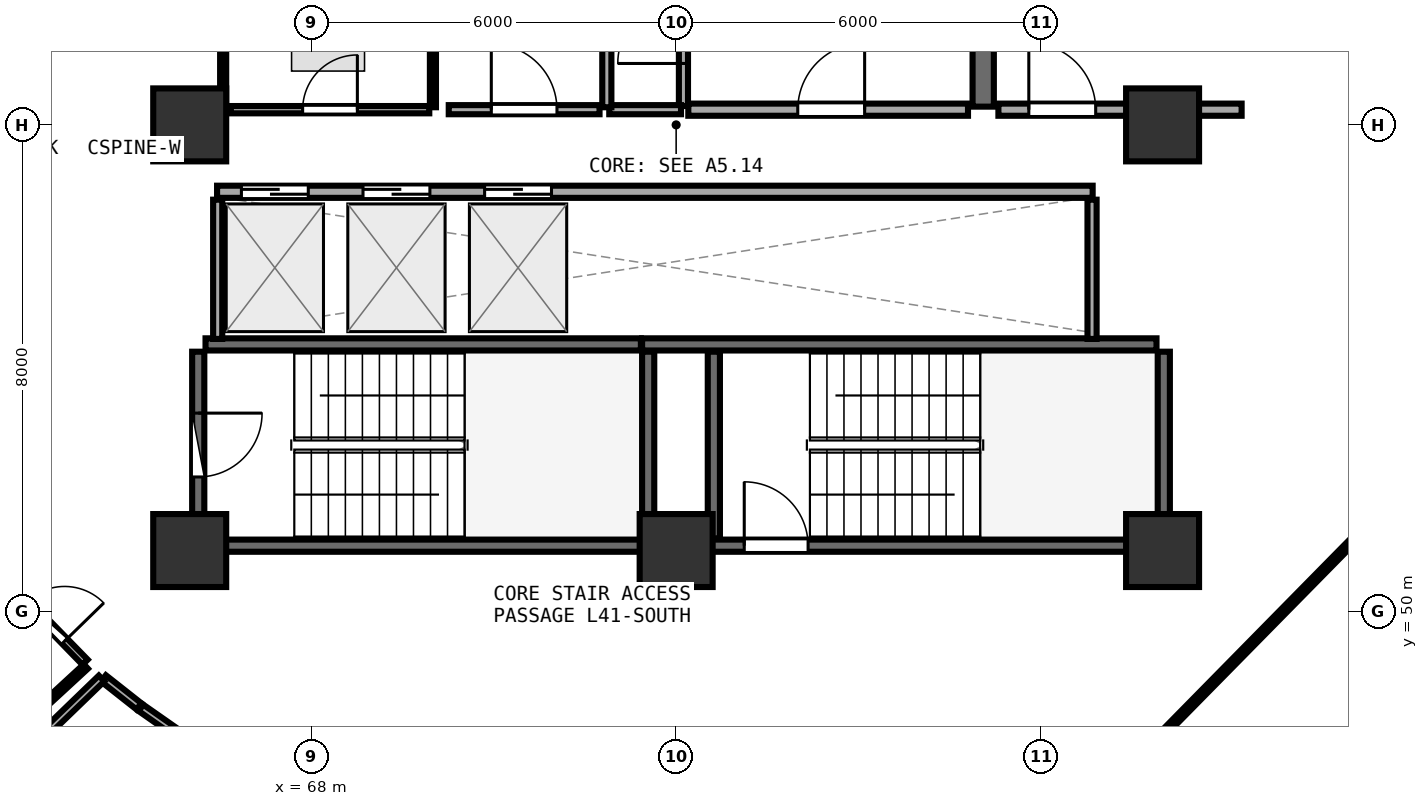
"""IFC4 building model, lengths in metres.
Left out: names, types, materials, properties, quantities, classifications, styles, units other than length and angle.
Written with IfcOpenShell. Run it as: python <this file> out.ifc"""

import sys

from ifc_helpers import new_model, si_unit, direction, frame, frame_2d, origin, origin_2d, place, context, subcontext, project, spatial, rectangle, extrude, element, fill, save


model = new_model("IFC4")
c1 = context("Model", 3, precision=1e-05, world=origin(), true_north=direction((0.0, 1.0)))
c2 = subcontext(c1, "Body", "Model", "MODEL_VIEW")
j1 = project(units=[si_unit("LENGTHUNIT", "METRE"), si_unit("PLANEANGLEUNIT", "RADIAN")], contexts=[c1])
p1 = place(None, origin())
s1 = spatial("IfcSite", under=j1, at=p1, CompositionType="ELEMENT")
p2 = place(p1, origin())
s2 = spatial("IfcBuilding", under=s1, at=p2, CompositionType="ELEMENT")
p3 = place(p2, frame((0.0, 0.0, 161.85)))
s3 = spatial("IfcBuildingStorey", under=s2, at=p3, CompositionType="ELEMENT", Elevation=161.85)
for number, where, z_axis, x_axis in (
    (1, (66.0, 51.0, 0.0), (0.0, 0.0, 1.0), (1.0, 0.0, 0.0)),
    (2, (74.0, 51.0, 0.0), (0.0, 0.0, 1.0), (1.0, 0.0, 0.0)),
    (3, (82.0, 51.0, 0.0), (0.0, 0.0, 1.0), (1.0, 0.0, 0.0)),
    (4, (82.0, 58.0, 0.0), (0.0, 0.0, 1.0), (1.0, 0.0, 0.0)),
    (5, (66.0, 58.0, 0.0), (0.0, 0.0, 1.0), (1.0, 0.0, 0.0)),
):
    element("IfcColumn", number, at=place(p3, frame(where, z_axis=z_axis, x_axis=x_axis)), inside=s3, PredefinedType="PILASTER", context=c2, shape_type="SweptSolid", body=[
        extrude(rectangle(XDim=1.2, YDim=1.2, at=origin_2d()), origin(), (0.0, 0.0, 1.0), 3.75),
    ])
p4 = place(p3, frame((74.0, 51.08, 0.0), z_axis=(0.0, 0.0, 1.0), x_axis=(1.0, 0.0, 0.0)))
e6 = element("IfcWall", 6, at=p4, inside=s3, PredefinedType="SHEAR", context=c2, shape_type="SweptSolid", body=[
    extrude(rectangle(XDim=7.9, YDim=0.2, at=frame_2d((3.95, 0.0))), origin(), (0.0, 0.0, 1.0), 3.49),
])
p5 = place(p4, frame((1.12, 0.0, 0.0)))
e7 = element("IfcOpeningElement", 7, at=p5, cuts=e6, PredefinedType="OPENING", context=c2, shape_type="SweptSolid", body=[
    extrude(rectangle(XDim=1.05, YDim=2.1, at=frame_2d((0.525, 1.05))), frame((0.0, 0.11, 0.0), z_axis=(0.0, -1.0, 0.0), x_axis=(1.0, 0.0, 0.0)), (0.0, 0.0, 1.0), 0.22),
])
p6 = place(p3, frame((82.02, 51.2, 0.0), z_axis=(0.0, 0.0, 1.0), x_axis=(0.0, 1.0, 0.0)))
e8 = element("IfcWall", 8, at=p6, inside=s3, PredefinedType="SHEAR", context=c2, shape_type="SweptSolid", body=[
    extrude(rectangle(XDim=3.07, YDim=0.2, at=frame_2d((1.535, 0.0))), origin(), (0.0, 0.0, 1.0), 3.49),
])
p7 = place(p3, frame((81.9, 54.39, 0.0), z_axis=(0.0, 0.0, 1.0), x_axis=(-1.0, 0.0, 0.0)))
e9 = element("IfcWall", 9, at=p7, inside=s3, PredefinedType="SHEAR", context=c2, shape_type="SweptSolid", body=[
    extrude(rectangle(XDim=8.46, YDim=0.2, at=frame_2d((4.23, 0.0))), origin(), (0.0, 0.0, 1.0), 3.49),
])
p8 = place(p3, frame((74.62, 54.27, 0.0), z_axis=(0.0, 0.0, 1.0), x_axis=(0.0, -1.0, 0.0)))
e10 = element("IfcWall", 10, at=p8, inside=s3, PredefinedType="SHEAR", context=c2, shape_type="SweptSolid", body=[
    extrude(rectangle(XDim=3.07, YDim=0.2, at=frame_2d((1.535, 0.0))), origin(), (0.0, 0.0, 1.0), 3.49),
])
p9 = place(p3, frame((66.26, 51.08, 0.0), z_axis=(0.0, 0.0, 1.0), x_axis=(1.0, 0.0, 0.0)))
e11 = element("IfcWall", 11, at=p9, inside=s3, PredefinedType="SHEAR", context=c2, shape_type="SweptSolid", body=[
    extrude(rectangle(XDim=7.16, YDim=0.2, at=frame_2d((3.58, 0.0))), origin(), (0.0, 0.0, 1.0), 3.49),
])
p10 = place(p3, frame((73.54, 51.2, 0.0), z_axis=(0.0, 0.0, 1.0), x_axis=(0.0, 1.0, 0.0)))
e12 = element("IfcWall", 12, at=p10, inside=s3, PredefinedType="SHEAR", context=c2, shape_type="SweptSolid", body=[
    extrude(rectangle(XDim=3.07, YDim=0.2, at=frame_2d((1.535, 0.0))), origin(), (0.0, 0.0, 1.0), 3.49),
])
p11 = place(p3, frame((73.42, 54.39, 0.0), z_axis=(0.0, 0.0, 1.0), x_axis=(-1.0, 0.0, 0.0)))
e13 = element("IfcWall", 13, at=p11, inside=s3, PredefinedType="SHEAR", context=c2, shape_type="SweptSolid", body=[
    extrude(rectangle(XDim=7.16, YDim=0.2, at=frame_2d((3.58, 0.0))), origin(), (0.0, 0.0, 1.0), 3.49),
])
p12 = place(p3, frame((66.14, 54.27, 0.0), z_axis=(0.0, 0.0, 1.0), x_axis=(0.0, -1.0, 0.0)))
e14 = element("IfcWall", 14, at=p12, inside=s3, PredefinedType="SHEAR", context=c2, shape_type="SweptSolid", body=[
    extrude(rectangle(XDim=3.07, YDim=0.2, at=frame_2d((1.535, 0.0))), origin(), (0.0, 0.0, 1.0), 3.49),
])
p13 = place(p12, frame((1.01, 0.0, 0.0)))
e15 = element("IfcOpeningElement", 15, at=p13, cuts=e14, PredefinedType="OPENING", context=c2, shape_type="SweptSolid", body=[
    extrude(rectangle(XDim=1.05, YDim=2.1, at=frame_2d((0.525, 1.05))), frame((0.0, 0.11, 0.0), z_axis=(0.0, -1.0, 0.0), x_axis=(1.0, 0.0, 0.0)), (0.0, 0.0, 1.0), 0.22),
])
p14 = place(p3, frame((79.05, 58.3, 0.0), z_axis=(0.0, 0.0, 1.0), x_axis=(0.0, 1.0, 0.0)))
e16 = element("IfcWall", 16, at=p14, inside=s3, PredefinedType="SHEAR", context=c2, shape_type="SweptSolid", body=[
    extrude(rectangle(XDim=6.3, YDim=0.35, at=frame_2d((3.15, 0.0))), origin(), (0.0, 0.0, 1.0), 3.49),
])
p15 = place(p3, frame((74.2, 58.25, 0.0), z_axis=(0.0, 0.0, 1.0), x_axis=(1.0, 0.0, 0.0)))
e17 = element("IfcWall", 17, at=p15, inside=s3, PredefinedType="SOLIDWALL", context=c2, shape_type="SweptSolid", body=[
    extrude(rectangle(XDim=4.6, YDim=0.2, at=frame_2d((2.3, 0.0))), origin(), (0.0, 0.0, 1.0), 3.48),
])
p16 = place(p15, frame((1.8, 0.0, 0.0)))
e18 = element("IfcOpeningElement", 18, at=p16, cuts=e17, PredefinedType="OPENING", context=c2, shape_type="SweptSolid", body=[
    extrude(rectangle(XDim=1.1, YDim=2.1, at=frame_2d((0.55, 1.05))), frame((0.0, 0.11, 0.0), z_axis=(0.0, -1.0, 0.0), x_axis=(1.0, 0.0, 0.0)), (0.0, 0.0, 1.0), 0.22),
])
p17 = place(p3, frame((79.3, 58.25, 0.0), z_axis=(0.0, 0.0, 1.0), x_axis=(1.0, 0.0, 0.0)))
e19 = element("IfcWall", 19, at=p17, inside=s3, PredefinedType="SOLIDWALL", context=c2, shape_type="SweptSolid", body=[
    extrude(rectangle(XDim=4.0, YDim=0.2, at=frame_2d((2.0, 0.0))), origin(), (0.0, 0.0, 1.0), 2.775),
])
p18 = place(p17, frame((0.5, 0.0, 0.0)))
e20 = element("IfcOpeningElement", 20, at=p18, cuts=e19, PredefinedType="OPENING", context=c2, shape_type="SweptSolid", body=[
    extrude(rectangle(XDim=1.1, YDim=2.1, at=frame_2d((0.55, 1.05))), frame((0.0, 0.11, 0.0), z_axis=(0.0, -1.0, 0.0), x_axis=(1.0, 0.0, 0.0)), (0.0, 0.0, 1.0), 0.22),
])
p19 = place(p3, frame((66.45, 56.9, 0.0), z_axis=(0.0, 0.0, 1.0), x_axis=(1.0, 0.0, 0.0)))
e21 = element("IfcWall", 21, at=p19, inside=s3, PredefinedType="SOLIDWALL", context=c2, shape_type="SweptSolid", body=[
    extrude(rectangle(XDim=14.4, YDim=0.2, at=frame_2d((7.2, 0.0))), origin(), (0.0, 0.0, 1.0), 3.48),
])
p20 = place(p19, frame((0.4, 0.0, 0.0)))
e22 = element("IfcOpeningElement", 22, at=p20, cuts=e21, PredefinedType="OPENING", context=c2, shape_type="SweptSolid", body=[
    extrude(rectangle(XDim=1.1, YDim=2.1, at=frame_2d((0.55, 1.05))), frame((0.0, 0.11, 0.0), z_axis=(0.0, -1.0, 0.0), x_axis=(1.0, 0.0, 0.0)), (0.0, 0.0, 1.0), 0.22),
])
p21 = place(p19, frame((2.4, 0.0, 0.0)))
e23 = element("IfcOpeningElement", 23, at=p21, cuts=e21, PredefinedType="OPENING", context=c2, shape_type="SweptSolid", body=[
    extrude(rectangle(XDim=1.1, YDim=2.1, at=frame_2d((0.55, 1.05))), frame((0.0, 0.11, 0.0), z_axis=(0.0, -1.0, 0.0), x_axis=(1.0, 0.0, 0.0)), (0.0, 0.0, 1.0), 0.22),
])
p22 = place(p19, frame((4.4, 0.0, 0.0)))
e24 = element("IfcOpeningElement", 24, at=p22, cuts=e21, PredefinedType="OPENING", context=c2, shape_type="SweptSolid", body=[
    extrude(rectangle(XDim=1.1, YDim=2.1, at=frame_2d((0.55, 1.05))), frame((0.0, 0.11, 0.0), z_axis=(0.0, -1.0, 0.0), x_axis=(1.0, 0.0, 0.0)), (0.0, 0.0, 1.0), 0.22),
])
for number, where, z_axis, x_axis in (
    (25, (66.46, 54.48, 0.0), (0.0, 0.0, 1.0), (0.0, 1.0, 0.0)),
    (26, (80.84, 54.48, 0.0), (0.0, 0.0, 1.0), (0.0, 1.0, 0.0)),
):
    element("IfcWall", number, at=place(p3, frame(where, z_axis=z_axis, x_axis=x_axis)), inside=s3, PredefinedType="PARTITIONING", context=c2, shape_type="SweptSolid", body=[
        extrude(rectangle(XDim=2.29, YDim=0.15, at=frame_2d((1.145, 0.0))), origin(), (0.0, 0.0, 1.0), 3.48),
    ])
p23 = place(p3, frame((74.12, 58.31, 0.0), z_axis=(0.0, 0.0, 1.0), x_axis=(0.0, 1.0, 0.0)))
e27 = element("IfcWall", 27, at=p23, inside=s3, PredefinedType="PARTITIONING", context=c2, shape_type="SweptSolid", body=[
    extrude(rectangle(XDim=2.48, YDim=0.15, at=frame_2d((1.24, 0.0))), origin(), (0.0, 0.0, 1.0), 3.48),
])
p24 = place(p23, frame((0.7, 0.0, 0.0)))
e28 = element("IfcOpeningElement", 28, at=p24, cuts=e27, PredefinedType="OPENING", context=c2, shape_type="SweptSolid", body=[
    extrude(rectangle(XDim=1.08, YDim=2.1, at=frame_2d((0.54, 1.05))), frame((0.0, 0.085, 0.0), z_axis=(0.0, -1.0, 0.0), x_axis=(1.0, 0.0, 0.0)), (0.0, 0.0, 1.0), 0.17),
])
p25 = place(p3, frame((66.675, 58.25, 0.0), z_axis=(0.0, 0.0, 1.0), x_axis=(1.0, 0.0, 0.0)))
e29 = element("IfcWall", 29, at=p25, inside=s3, PredefinedType="PARTITIONING", context=c2, shape_type="SweptSolid", body=[
    extrude(rectangle(XDim=3.265, YDim=0.12, at=frame_2d((1.632, 0.0))), origin(), (0.0, 0.0, 1.0), 3.48),
])
p26 = place(p25, frame((1.182, 0.0, 0.0)))
e30 = element("IfcOpeningElement", 30, at=p26, cuts=e29, PredefinedType="OPENING", context=c2, shape_type="SweptSolid", body=[
    extrude(rectangle(XDim=0.9, YDim=2.08, at=frame_2d((0.45, 1.04))), frame((0.0, 0.07, 0.0), z_axis=(0.0, -1.0, 0.0), x_axis=(1.0, 0.0, 0.0)), (0.0, 0.0, 1.0), 0.14),
])
p27 = place(p3, frame((70.26, 58.25, 0.0), z_axis=(0.0, 0.0, 1.0), x_axis=(1.0, 0.0, 0.0)))
e31 = element("IfcWall", 31, at=p27, inside=s3, PredefinedType="PARTITIONING", context=c2, shape_type="SweptSolid", body=[
    extrude(rectangle(XDim=2.48, YDim=0.15, at=frame_2d((1.24, 0.0))), origin(), (0.0, 0.0, 1.0), 3.48),
])
p28 = place(p27, frame((0.7, 0.0, 0.0)))
e32 = element("IfcOpeningElement", 32, at=p28, cuts=e31, PredefinedType="OPENING", context=c2, shape_type="SweptSolid", body=[
    extrude(rectangle(XDim=1.08, YDim=2.1, at=frame_2d((0.54, 1.05))), frame((0.0, 0.085, 0.0), z_axis=(0.0, -1.0, 0.0), x_axis=(1.0, 0.0, 0.0)), (0.0, 0.0, 1.0), 0.17),
])
p29 = place(p3, frame((62.977, 50.5, 0.0), z_axis=(0.0, 0.0, 1.0), x_axis=(0.69801962686, -0.71607862733, 0.0)))
e33 = element("IfcWall", 33, at=p29, inside=s3, PredefinedType="PARTITIONING", context=c2, shape_type="SweptSolid", body=[
    extrude(rectangle(XDim=1.866, YDim=0.12, at=frame_2d((0.933, 0.0))), origin(), (0.0, 0.0, 1.0), 2.975),
])
p30 = place(p29, frame((0.483, 0.0, 0.0)))
e34 = element("IfcOpeningElement", 34, at=p30, cuts=e33, PredefinedType="OPENING", context=c2, shape_type="SweptSolid", body=[
    extrude(rectangle(XDim=0.9, YDim=2.08, at=frame_2d((0.45, 1.04))), frame((0.0, 0.07, 0.0), z_axis=(0.0, -1.0, 0.0), x_axis=(1.0, 0.0, 0.0)), (0.0, 0.0, 1.0), 0.14),
])
p31 = place(p3, frame((72.9, 58.25, 0.0), z_axis=(0.0, 0.0, 1.0), x_axis=(1.0, 0.0, 0.0)))
e35 = element("IfcWall", 35, at=p31, inside=s3, PredefinedType="PARTITIONING", context=c2, shape_type="SweptSolid", body=[
    extrude(rectangle(XDim=1.18, YDim=0.15, at=frame_2d((0.59, 0.0))), origin(), (0.0, 0.0, 1.0), 3.48),
])
p32 = place(p3, frame((72.86, 60.81, 0.0), z_axis=(0.0, 0.0, 1.0), x_axis=(0.0, -1.0, 0.0)))
e36 = element("IfcWall", 36, at=p32, inside=s3, PredefinedType="PARTITIONING", context=c2, shape_type="SweptSolid", body=[
    extrude(rectangle(XDim=2.52, YDim=0.15, at=frame_2d((1.26, 0.0))), origin(), (0.0, 0.0, 1.0), 3.48),
])
p33 = place(p3, frame((70.0, 58.29, 0.0), z_axis=(0.0, 0.0, 1.0), x_axis=(0.0, 1.0, 0.0)))
e37 = element("IfcWall", 37, at=p33, inside=s3, PredefinedType="PARTITIONING", context=c2, shape_type="SweptSolid", body=[
    extrude(rectangle(XDim=2.39, YDim=0.1, at=frame_2d((1.195, 0.0))), origin(), (0.0, 0.0, 1.0), 3.48),
])
p34 = place(p3, frame((66.55, 60.68, 0.0), z_axis=(0.0, 0.0, 1.0), x_axis=(0.0, -1.0, 0.0)))
e38 = element("IfcWall", 38, at=p34, inside=s3, PredefinedType="PARTITIONING", context=c2, shape_type="SweptSolid", body=[
    extrude(rectangle(XDim=2.383, YDim=0.1, at=frame_2d((1.191, 0.0))), origin(), (0.0, 0.0, 1.0), 3.48),
])
p35 = place(p3, frame((81.722, 47.699, 0.0), z_axis=(0.0, 0.0, 1.0), x_axis=(0.701417862724, 0.712750294179, 0.0)))
e39 = element("IfcWall", 39, at=p35, inside=s3, PredefinedType="PARTITIONING", context=c2, shape_type="SweptSolid", body=[
    extrude(rectangle(XDim=6.549, YDim=0.1, at=frame_2d((3.275, 0.0))), origin(), (0.0, 0.0, 1.0), 2.975),
])
p36 = place(p3, frame((64.292, 49.094, 0.0), z_axis=(0.0, 0.0, 1.0), x_axis=(-0.73529828134, -0.677743636973, 0.0)))
e40 = element("IfcWall", 40, at=p36, inside=s3, PredefinedType="PARTITIONING", context=c2, shape_type="SweptSolid", body=[
    extrude(rectangle(XDim=7.771, YDim=0.1, at=frame_2d((3.886, 0.0))), origin(), (0.0, 0.0, 1.0), 3.025),
])
p37 = place(p3, frame((64.581, 48.899, 0.0), z_axis=(0.0, 0.0, 1.0), x_axis=(0.785042223167, -0.619442255456, 0.0)))
e41 = element("IfcWall", 41, at=p37, inside=s3, PredefinedType="PLUMBINGWALL", context=c2, shape_type="SweptSolid", body=[
    extrude(rectangle(XDim=0.745, YDim=0.13, at=frame_2d((0.372, 0.0))), origin(), (0.0, 0.0, 1.0), 2.975),
])
p38 = place(p3, frame((65.198, 48.414, 0.0), z_axis=(0.0, 0.0, 1.0), x_axis=(0.819339212877, -0.573309039038, 0.0)))
e42 = element("IfcWall", 42, at=p38, inside=s3, PredefinedType="PLUMBINGWALL", context=c2, shape_type="SweptSolid", body=[
    extrude(rectangle(XDim=0.748, YDim=0.13, at=frame_2d((0.374, 0.0))), origin(), (0.0, 0.0, 1.0), 2.975),
])
p39 = place(p3, frame((62.581, 46.994, 0.0), z_axis=(0.0, 0.0, 1.0), x_axis=(0.719038860306, 0.694969867958, 0.0)))
e43 = element("IfcWall", 43, at=p39, inside=s3, PredefinedType="PLUMBINGWALL", context=c2, shape_type="SweptSolid", body=[
    extrude(rectangle(XDim=2.739, YDim=0.13, at=frame_2d((1.369, 0.0))), origin(), (0.0, 0.0, 1.0), 3.235),
])
p40 = place(p5, origin())
e44 = element("IfcDoor", 44, at=p40, inside=s3, OperationType="SINGLE_SWING_LEFT", PredefinedType="DOOR", context=c2, shape_type="SweptSolid", body=[
    extrude(rectangle(XDim=1.05, YDim=2.1, at=frame_2d((0.525, 1.05))), frame((0.0, 0.025, 0.0), z_axis=(0.0, -1.0, 0.0), x_axis=(1.0, 0.0, 0.0)), (0.0, 0.0, 1.0), 0.05),
])
fill(e7, e44)
p41 = place(p13, origin())
e45 = element("IfcDoor", 45, at=p41, inside=s3, OperationType="SINGLE_SWING_LEFT", PredefinedType="DOOR", context=c2, shape_type="SweptSolid", body=[
    extrude(rectangle(XDim=1.05, YDim=2.1, at=frame_2d((0.525, 1.05))), frame((0.0, 0.025, 0.0), z_axis=(0.0, -1.0, 0.0), x_axis=(1.0, 0.0, 0.0)), (0.0, 0.0, 1.0), 0.05),
])
fill(e15, e45)
p42 = place(p16, frame((1.1, 0.0, 0.0), z_axis=(0.0, 0.0, 1.0), x_axis=(-1.0, 0.0, 0.0)))
e46 = element("IfcDoor", 46, at=p42, inside=s3, OperationType="SINGLE_SWING_LEFT", PredefinedType="DOOR", context=c2, shape_type="SweptSolid", body=[
    extrude(rectangle(XDim=1.1, YDim=2.1, at=frame_2d((0.55, 1.05))), frame((0.0, 0.025, 0.0), z_axis=(0.0, -1.0, 0.0), x_axis=(1.0, 0.0, 0.0)), (0.0, 0.0, 1.0), 0.05),
])
fill(e18, e46)
p43 = place(p18, frame((1.1, 0.0, 0.0), z_axis=(0.0, 0.0, 1.0), x_axis=(-1.0, 0.0, 0.0)))
e47 = element("IfcDoor", 47, at=p43, inside=s3, OperationType="SINGLE_SWING_RIGHT", PredefinedType="DOOR", context=c2, shape_type="SweptSolid", body=[
    extrude(rectangle(XDim=1.1, YDim=2.1, at=frame_2d((0.55, 1.05))), frame((0.0, 0.025, 0.0), z_axis=(0.0, -1.0, 0.0), x_axis=(1.0, 0.0, 0.0)), (0.0, 0.0, 1.0), 0.05),
])
fill(e20, e47)
p44 = place(p20, origin())
e48 = element("IfcDoor", 48, at=p44, inside=s3, OperationType="DOUBLE_DOOR_SLIDING", PredefinedType="DOOR", context=c2, shape_type="SweptSolid", body=[
    extrude(rectangle(XDim=1.1, YDim=2.1, at=frame_2d((0.55, 1.05))), frame((0.0, 0.025, 0.0), z_axis=(0.0, -1.0, 0.0), x_axis=(1.0, 0.0, 0.0)), (0.0, 0.0, 1.0), 0.05),
])
fill(e22, e48)
p45 = place(p21, origin())
e49 = element("IfcDoor", 49, at=p45, inside=s3, OperationType="DOUBLE_DOOR_SLIDING", PredefinedType="DOOR", context=c2, shape_type="SweptSolid", body=[
    extrude(rectangle(XDim=1.1, YDim=2.1, at=frame_2d((0.55, 1.05))), frame((0.0, 0.025, 0.0), z_axis=(0.0, -1.0, 0.0), x_axis=(1.0, 0.0, 0.0)), (0.0, 0.0, 1.0), 0.05),
])
fill(e23, e49)
p46 = place(p22, origin())
e50 = element("IfcDoor", 50, at=p46, inside=s3, OperationType="DOUBLE_DOOR_SLIDING", PredefinedType="DOOR", context=c2, shape_type="SweptSolid", body=[
    extrude(rectangle(XDim=1.1, YDim=2.1, at=frame_2d((0.55, 1.05))), frame((0.0, 0.025, 0.0), z_axis=(0.0, -1.0, 0.0), x_axis=(1.0, 0.0, 0.0)), (0.0, 0.0, 1.0), 0.05),
])
fill(e24, e50)
p47 = place(p24, origin())
e51 = element("IfcDoor", 51, at=p47, inside=s3, OperationType="SINGLE_SWING_LEFT", PredefinedType="DOOR", context=c2, shape_type="SweptSolid", body=[
    extrude(rectangle(XDim=1.08, YDim=2.1, at=frame_2d((0.54, 1.05))), frame((0.0, 0.025, 0.0), z_axis=(0.0, -1.0, 0.0), x_axis=(1.0, 0.0, 0.0)), (0.0, 0.0, 1.0), 0.05),
])
fill(e28, e51)
p48 = place(p26, origin())
e52 = element("IfcDoor", 52, at=p48, inside=s3, OperationType="SINGLE_SWING_RIGHT", PredefinedType="DOOR", context=c2, shape_type="SweptSolid", body=[
    extrude(rectangle(XDim=0.9, YDim=2.08, at=frame_2d((0.45, 1.04))), frame((0.0, 0.025, 0.0), z_axis=(0.0, -1.0, 0.0), x_axis=(1.0, 0.0, 0.0)), (0.0, 0.0, 1.0), 0.05),
])
fill(e30, e52)
p49 = place(p28, origin())
e53 = element("IfcDoor", 53, at=p49, inside=s3, OperationType="SINGLE_SWING_LEFT", PredefinedType="DOOR", context=c2, shape_type="SweptSolid", body=[
    extrude(rectangle(XDim=1.08, YDim=2.1, at=frame_2d((0.54, 1.05))), frame((0.0, 0.025, 0.0), z_axis=(0.0, -1.0, 0.0), x_axis=(1.0, 0.0, 0.0)), (0.0, 0.0, 1.0), 0.05),
])
fill(e32, e53)
p50 = place(p30, origin())
e54 = element("IfcDoor", 54, at=p50, inside=s3, OperationType="SINGLE_SWING_RIGHT", PredefinedType="DOOR", context=c2, shape_type="SweptSolid", body=[
    extrude(rectangle(XDim=0.9, YDim=2.08, at=frame_2d((0.45, 1.04))), frame((0.0, 0.025, 0.0), z_axis=(0.0, -1.0, 0.0), x_axis=(1.0, 0.0, 0.0)), (0.0, 0.0, 1.0), 0.05),
])
fill(e34, e54)
save(model, sys.argv[1])
